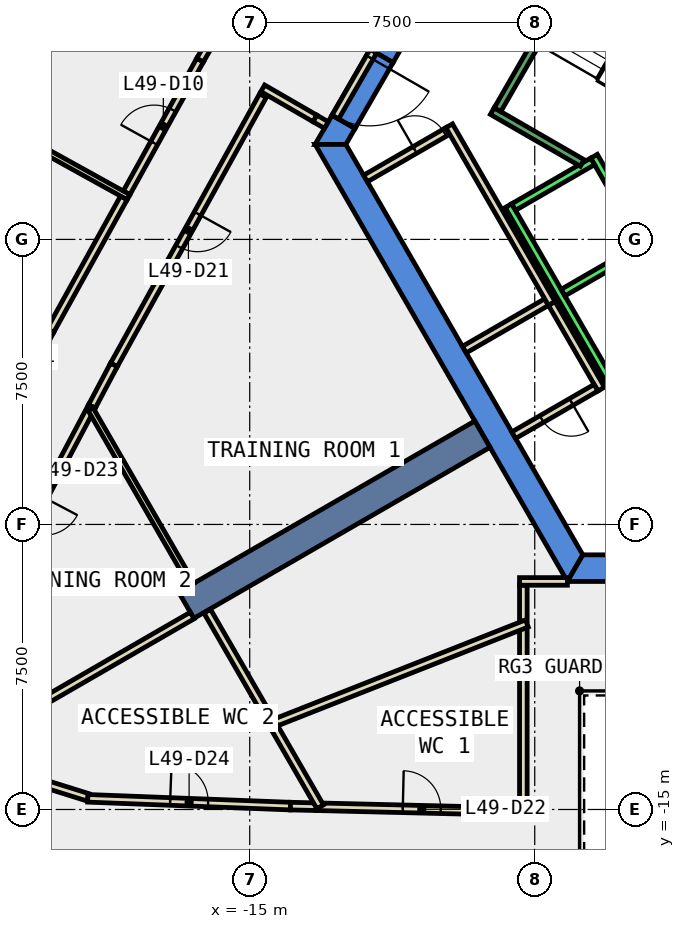
"""IFC4 building model, lengths in metres.
Left out: names, types, materials, properties, quantities, classifications, styles, units other than length and angle.
Written with IfcOpenShell. Run it as: python <this file> out.ifc"""

import sys

from ifc_helpers import new_model, si_unit, direction, frame, frame_2d, origin, place, context, subcontext, project, spatial, polyline, rectangle, outline, extrude, element, fill, save


model = new_model("IFC4")
c1 = context("Model", 3, precision=1e-05, world=origin(), true_north=direction((0.0, 1.0)))
c2 = subcontext(c1, "Body", "Model", "MODEL_VIEW")
j1 = project(units=[si_unit("LENGTHUNIT", "METRE"), si_unit("PLANEANGLEUNIT", "RADIAN")], contexts=[c1])
p1 = place(None, origin())
s1 = spatial("IfcSite", under=j1, at=p1, CompositionType="ELEMENT")
p2 = place(p1, origin())
s2 = spatial("IfcBuilding", under=s1, at=p2, CompositionType="ELEMENT")
p3 = place(p2, frame((0.0, 0.0, 219.2)))
s3 = spatial("IfcBuildingStorey", under=s2, at=p3, CompositionType="ELEMENT", Elevation=219.2)
p4 = place(p3, frame((0.0, 0.0, -0.4)))
e1 = element("IfcWall", 1, at=p4, inside=s3, PredefinedType="SHEAR", context=c2, shape_type="SweptSolid", body=[
    extrude(outline(polyline([(-11.834, 5.002), (-11.228, 4.652), (-6.235, 13.3), (-6.64, 14.0), (-11.834, 5.002)])), origin(), (0.0, 0.0, 1.0), 4.2),
])
p5 = place(p3, frame((0.0, 0.0, -0.4)))
e2 = element("IfcWall", 2, at=p5, inside=s3, PredefinedType="SHEAR", context=c2, shape_type="SweptSolid", body=[
    extrude(outline(polyline([(-12.228, 2.92), (-12.834, 3.27), (-13.279, 2.5), (-12.471, 2.5), (-12.228, 2.92)])), origin(), (0.0, 0.0, 1.0), 4.2),
])
p6 = place(p3, frame((0.0, 0.0, 3.6)))
e3 = element("IfcWall", 3, at=p6, inside=s3, PredefinedType="SHEAR", context=c2, shape_type="SweptSolid", body=[
    extrude(outline(polyline([(-12.834, 3.27), (-12.228, 2.92), (-11.228, 4.652), (-11.834, 5.002), (-12.834, 3.27)])), origin(), (0.0, 0.0, 1.0), 0.2),
])
p7 = place(p3, frame((0.0, 0.0, -0.4)))
e4 = element("IfcWall", 4, at=p7, inside=s3, PredefinedType="SHEAR", context=c2, shape_type="SweptSolid", body=[
    extrude(outline(polyline([(-13.279, 2.5), (-6.64, -9.0), (-6.235, -8.3), (-12.471, 2.5), (-13.279, 2.5)])), origin(), (0.0, 0.0, 1.0), 4.2),
])
p8 = place(p3, frame((0.0, 0.0, -0.4)))
e5 = element("IfcWall", 5, at=p8, inside=s3, PredefinedType="SHEAR", context=c2, shape_type="SweptSolid", body=[
    extrude(outline(polyline([(3.75, -9.0), (3.75, -8.3), (-6.235, -8.3), (-6.64, -9.0), (3.75, -9.0)])), origin(), (0.0, 0.0, 1.0), 4.2),
])
p9 = place(p3, frame((-8.877, -5.125, -0.4), z_axis=(0.0, 0.0, 1.0), x_axis=(-0.866017533419, -0.500013631625, 0.0)))
e6 = element("IfcWall", 6, at=p9, inside=s3, PredefinedType="SHEAR", context=c2, shape_type="SweptSolid", body=[
    extrude(rectangle(XDim=9.0, YDim=0.8, at=frame_2d((4.5, 0.0))), origin(), (0.0, 0.0, 1.0), 4.2),
])
p10 = place(p3, frame((-12.984, 3.01, 0.0), z_axis=(0.0, 0.0, 1.0), x_axis=(-0.866046247233, 0.49996389635, 0.0)))
e7 = element("IfcWall", 7, at=p10, inside=s3, PredefinedType="PARTITIONING", context=c2, shape_type="SweptSolid", body=[
    extrude(rectangle(XDim=0.35, YDim=0.2, at=frame_2d((0.175, 0.0))), origin(), (0.0, 0.0, 1.0), 2.4),
])
p11 = place(p3, frame((-14.652, 3.783, 0.0), z_axis=(0.0, 0.0, 1.0), x_axis=(-0.484249955458, -0.874929700398, 0.0)))
e8 = element("IfcWall", 8, at=p11, inside=s3, PredefinedType="PARTITIONING", context=c2, shape_type="SweptSolid", body=[
    extrude(rectangle(XDim=8.099, YDim=0.2, at=frame_2d((4.049, 0.0))), origin(), (0.0, 0.0, 1.0), 3.8),
])
p12 = place(p11, frame((3.55, 0.0, 0.0)))
e9 = element("IfcOpeningElement", 9, at=p12, cuts=e8, PredefinedType="OPENING", context=c2, shape_type="SweptSolid", body=[
    extrude(rectangle(XDim=1.0, YDim=2.1, at=frame_2d((0.5, 1.05))), frame((0.0, 0.11, 0.0), z_axis=(0.0, -1.0, 0.0), x_axis=(1.0, 0.0, 0.0)), (0.0, 0.0, 1.0), 0.22),
])
p13 = place(p3, frame((-18.574, -3.303, 0.0), z_axis=(0.0, 0.0, 1.0), x_axis=(-0.468458328651, -0.883485593724, 0.0)))
e10 = element("IfcWall", 10, at=p13, inside=s3, PredefinedType="PARTITIONING", context=c2, shape_type="SweptSolid", body=[
    extrude(rectangle(XDim=1.238, YDim=0.2, at=frame_2d((0.619, 0.0))), origin(), (0.0, 0.0, 1.0), 3.8),
])
p14 = place(p3, frame((-13.246, -14.927, 0.0), z_axis=(0.0, 0.0, 1.0), x_axis=(0.999708107757, -0.024159869312, 0.0)))
e11 = element("IfcWall", 11, at=p14, inside=s3, PredefinedType="PARTITIONING", context=c2, shape_type="SweptSolid", body=[
    extrude(rectangle(XDim=5.548, YDim=0.2, at=frame_2d((2.774, 0.0))), origin(), (0.0, 0.0, 1.0), 3.8),
])
p15 = place(p14, frame((2.274, 0.0, 0.0)))
e12 = element("IfcOpeningElement", 12, at=p15, cuts=e11, PredefinedType="OPENING", context=c2, shape_type="SweptSolid", body=[
    extrude(rectangle(XDim=1.0, YDim=2.1, at=frame_2d((0.5, 1.05))), frame((0.0, 0.11, 0.0), z_axis=(0.0, -1.0, 0.0), x_axis=(1.0, 0.0, 0.0)), (0.0, 0.0, 1.0), 0.22),
])
p16 = place(p3, frame((-19.154, -4.397, 0.0), z_axis=(0.0, 0.0, 1.0), x_axis=(-0.468118749105, -0.883665568378, 0.0)))
e13 = element("IfcWall", 13, at=p16, inside=s3, PredefinedType="PARTITIONING", context=c2, shape_type="SweptSolid", body=[
    extrude(rectangle(XDim=6.409, YDim=0.2, at=frame_2d((3.204, 0.0))), origin(), (0.0, 0.0, 1.0), 3.8),
])
p17 = place(p16, frame((2.704, 0.0, 0.0)))
e14 = element("IfcOpeningElement", 14, at=p17, cuts=e13, PredefinedType="OPENING", context=c2, shape_type="SweptSolid", body=[
    extrude(rectangle(XDim=1.0, YDim=2.1, at=frame_2d((0.5, 1.05))), frame((0.0, 0.11, 0.0), z_axis=(0.0, -1.0, 0.0), x_axis=(1.0, 0.0, 0.0)), (0.0, 0.0, 1.0), 0.22),
])
p18 = place(p3, frame((-21.759, -13.896, 0.0), z_axis=(0.0, 0.0, 1.0), x_axis=(0.954254371194, -0.298995978328, 0.0)))
e15 = element("IfcWall", 15, at=p18, inside=s3, PredefinedType="PARTITIONING", context=c2, shape_type="SweptSolid", body=[
    extrude(rectangle(XDim=2.622, YDim=0.2, at=frame_2d((1.311, 0.0))), origin(), (0.0, 0.0, 1.0), 3.8),
])
p19 = place(p3, frame((-19.261, -14.706, 0.0), z_axis=(0.0, 0.0, 1.0), x_axis=(0.999262930749, -0.038387435847, 0.0)))
e16 = element("IfcWall", 16, at=p19, inside=s3, PredefinedType="PARTITIONING", context=c2, shape_type="SweptSolid", body=[
    extrude(rectangle(XDim=5.336, YDim=0.2, at=frame_2d((2.668, 0.0))), origin(), (0.0, 0.0, 1.0), 3.8),
])
p20 = place(p19, frame((2.168, 0.0, 0.0)))
e17 = element("IfcOpeningElement", 17, at=p20, cuts=e16, PredefinedType="OPENING", context=c2, shape_type="SweptSolid", body=[
    extrude(rectangle(XDim=1.0, YDim=2.1, at=frame_2d((0.5, 1.05))), frame((0.0, 0.11, 0.0), z_axis=(0.0, -1.0, 0.0), x_axis=(1.0, 0.0, 0.0)), (0.0, 0.0, 1.0), 0.22),
])
p21 = place(p3, frame((-13.929, -14.911, 0.0), z_axis=(0.0, 0.0, 1.0), x_axis=(0.999721713829, -0.023590144123, 0.0)))
e18 = element("IfcWall", 18, at=p21, inside=s3, PredefinedType="PARTITIONING", context=c2, shape_type="SweptSolid", body=[
    extrude(rectangle(XDim=0.683, YDim=0.2, at=frame_2d((0.342, 0.0))), origin(), (0.0, 0.0, 1.0), 3.8),
])
p22 = place(p3, frame((-18.24, 1.225, 0.0), z_axis=(0.0, 0.0, 1.0), x_axis=(0.484411997038, 0.874839995156, 0.0)))
e19 = element("IfcWall", 19, at=p22, inside=s3, PredefinedType="PARTITIONING", context=c2, shape_type="SweptSolid", body=[
    extrude(rectangle(XDim=3.993, YDim=0.2, at=frame_2d((1.996, 0.0))), origin(), (0.0, 0.0, 1.0), 3.8),
])
p23 = place(p22, frame((1.496, 0.0, 0.0)))
e20 = element("IfcOpeningElement", 20, at=p23, cuts=e19, PredefinedType="OPENING", context=c2, shape_type="SweptSolid", body=[
    extrude(rectangle(XDim=1.0, YDim=2.1, at=frame_2d((0.5, 1.05))), frame((0.0, 0.11, 0.0), z_axis=(0.0, -1.0, 0.0), x_axis=(1.0, 0.0, 0.0)), (0.0, 0.0, 1.0), 0.22),
])
p24 = place(p3, frame((-16.306, 4.718, 0.0), z_axis=(0.0, 0.0, 1.0), x_axis=(0.499803646539, 0.866138738832, 0.0)))
e21 = element("IfcWall", 21, at=p24, inside=s3, PredefinedType="PARTITIONING", context=c2, shape_type="SweptSolid", body=[
    extrude(rectangle(XDim=3.991, YDim=0.2, at=frame_2d((1.996, 0.0))), origin(), (0.0, 0.0, 1.0), 3.8),
])
p25 = place(p3, frame((-22.14, -5.976, 0.0), z_axis=(0.0, 0.0, 1.0), x_axis=(0.467979143965, 0.883739509592, 0.0)))
e22 = element("IfcWall", 22, at=p25, inside=s3, PredefinedType="PARTITIONING", context=c2, shape_type="SweptSolid", body=[
    extrude(rectangle(XDim=4.049, YDim=0.2, at=frame_2d((2.024, 0.0))), origin(), (0.0, 0.0, 1.0), 3.8),
])
p26 = place(p25, frame((1.524, 0.0, 0.0)))
e23 = element("IfcOpeningElement", 23, at=p26, cuts=e22, PredefinedType="OPENING", context=c2, shape_type="SweptSolid", body=[
    extrude(rectangle(XDim=1.0, YDim=2.1, at=frame_2d((0.5, 1.05))), frame((0.0, 0.11, 0.0), z_axis=(0.0, -1.0, 0.0), x_axis=(1.0, 0.0, 0.0)), (0.0, 0.0, 1.0), 0.22),
])
p27 = place(p3, frame((-20.245, -2.398, 0.0), z_axis=(0.0, 0.0, 1.0), x_axis=(0.484328424129, 0.874886265511, 0.0)))
e24 = element("IfcWall", 24, at=p27, inside=s3, PredefinedType="PARTITIONING", context=c2, shape_type="SweptSolid", body=[
    extrude(rectangle(XDim=3.991, YDim=0.2, at=frame_2d((1.996, 0.0))), origin(), (0.0, 0.0, 1.0), 3.8),
])
p28 = place(p3, frame((-19.583, -16.569, 0.0), z_axis=(0.0, 0.0, 1.0), x_axis=(-0.954238750745, 0.299045826884, 0.0)))
e25 = element("IfcWall", 25, at=p28, inside=s3, PredefinedType="PARTITIONING", context=c2, shape_type="SweptSolid", body=[
    extrude(rectangle(XDim=3.318, YDim=0.2, at=frame_2d((1.659, 0.0))), origin(), (0.0, 0.0, 1.0), 3.8),
])
p29 = place(p28, frame((1.159, 0.0, 0.0)))
e26 = element("IfcOpeningElement", 26, at=p29, cuts=e25, PredefinedType="OPENING", context=c2, shape_type="SweptSolid", body=[
    extrude(rectangle(XDim=1.0, YDim=2.1, at=frame_2d((0.5, 1.05))), frame((0.0, 0.11, 0.0), z_axis=(0.0, -1.0, 0.0), x_axis=(1.0, 0.0, 0.0)), (0.0, 0.0, 1.0), 0.22),
])
p30 = place(p3, frame((-7.188, -1.65, 0.0), z_axis=(0.0, 0.0, 1.0), x_axis=(-0.866022959057, -0.500004234368, 0.0)))
e27 = element("IfcWall", 27, at=p30, inside=s3, PredefinedType="PARTITIONING", context=c2, shape_type="SweptSolid", body=[
    extrude(rectangle(XDim=2.5, YDim=0.2, at=frame_2d((1.25, 0.0))), origin(), (0.0, 0.0, 1.0), 3.8),
])
p31 = place(p3, frame((-11.953, 1.603, 0.0), z_axis=(0.0, 0.0, 1.0), x_axis=(0.865998541277, 0.500046524342, 0.0)))
e28 = element("IfcWall", 28, at=p31, inside=s3, PredefinedType="PARTITIONING", context=c2, shape_type="SweptSolid", body=[
    extrude(rectangle(XDim=2.5, YDim=0.2, at=frame_2d((1.25, 0.0))), origin(), (0.0, 0.0, 1.0), 3.8),
])
p32 = place(p31, frame((1.5, 0.0, 0.0)))
e29 = element("IfcOpeningElement", 29, at=p32, cuts=e28, PredefinedType="OPENING", context=c2, shape_type="SweptSolid", body=[
    extrude(rectangle(XDim=0.9, YDim=2.1, at=frame_2d((0.45, 1.05))), frame((0.0, 0.11, 0.0), z_axis=(0.0, -1.0, 0.0), x_axis=(1.0, 0.0, 0.0)), (0.0, 0.0, 1.0), 0.22),
])
p33 = place(p3, frame((-9.751, 2.99, 0.0), z_axis=(0.0, 0.0, 1.0), x_axis=(0.499955951776, -0.866050833545, 0.0)))
e30 = element("IfcWall", 30, at=p33, inside=s3, PredefinedType="PARTITIONING", context=c2, shape_type="SweptSolid", body=[
    extrude(rectangle(XDim=5.4, YDim=0.2, at=frame_2d((2.7, 0.0))), origin(), (0.0, 0.0, 1.0), 3.8),
])
p34 = place(p3, frame((-7.051, -1.687, 0.0), z_axis=(0.0, 0.0, 1.0), x_axis=(0.500128937424, -0.865950948929, 0.0)))
e31 = element("IfcWall", 31, at=p34, inside=s3, PredefinedType="PARTITIONING", context=c2, shape_type="SweptSolid", body=[
    extrude(rectangle(XDim=2.599, YDim=0.2, at=frame_2d((1.3, 0.0))), origin(), (0.0, 0.0, 1.0), 3.8),
])
p35 = place(p3, frame((-5.888, -3.902, 0.0), z_axis=(0.0, 0.0, 1.0), x_axis=(-0.866022959057, -0.500004234368, 0.0)))
e32 = element("IfcWall", 32, at=p35, inside=s3, PredefinedType="PARTITIONING", context=c2, shape_type="SweptSolid", body=[
    extrude(rectangle(XDim=2.5, YDim=0.2, at=frame_2d((1.25, 0.0))), origin(), (0.0, 0.0, 1.0), 3.8),
])
p36 = place(p35, frame((0.75, 0.0, 0.0)))
e33 = element("IfcOpeningElement", 33, at=p36, cuts=e32, PredefinedType="OPENING", context=c2, shape_type="SweptSolid", body=[
    extrude(rectangle(XDim=0.9, YDim=2.1, at=frame_2d((0.45, 1.05))), frame((0.0, 0.11, 0.0), z_axis=(0.0, -1.0, 0.0), x_axis=(1.0, 0.0, 0.0)), (0.0, 0.0, 1.0), 0.22),
])
p37 = place(p3, frame((-7.8, -10.041, 0.0), z_axis=(0.0, 0.0, 1.0), x_axis=(0.0, 1.0, 0.0)))
e34 = element("IfcWall", 34, at=p37, inside=s3, PredefinedType="PARTITIONING", context=c2, shape_type="SweptSolid", body=[
    extrude(rectangle(XDim=0.942, YDim=0.2, at=frame_2d((0.471, 0.0))), origin(), (0.0, 0.0, 1.0), 3.8),
])
p38 = place(p3, frame((-7.9, -8.999, 0.0), z_axis=(0.0, 0.0, 1.0), x_axis=(1.0, 0.0, 0.0)))
e35 = element("IfcWall", 35, at=p38, inside=s3, PredefinedType="PARTITIONING", context=c2, shape_type="SweptSolid", body=[
    extrude(rectangle(XDim=1.259, YDim=0.2, at=frame_2d((0.629, 0.0))), origin(), (0.0, 0.0, 1.0), 3.8),
])
p39 = place(p3, frame((-7.8, -14.959, 0.0), z_axis=(0.0, 0.0, 1.0), x_axis=(0.0, 1.0, 0.0)))
e36 = element("IfcWall", 36, at=p39, inside=s3, PredefinedType="PARTITIONING", context=c2, shape_type="SweptSolid", body=[
    extrude(rectangle(XDim=4.718, YDim=0.2, at=frame_2d((2.359, 0.0))), origin(), (0.0, 0.0, 1.0), 3.8),
])
p40 = place(p3, frame((-7.707, -10.105, 0.0), z_axis=(0.0, 0.0, 1.0), x_axis=(-0.930316800812, -0.36675693603, 0.0)))
e37 = element("IfcWall", 37, at=p40, inside=s3, PredefinedType="PARTITIONING", context=c2, shape_type="SweptSolid", body=[
    extrude(rectangle(XDim=7.302, YDim=0.2, at=frame_2d((3.651, 0.0))), origin(), (0.0, 0.0, 1.0), 3.8),
])
p41 = place(p3, frame((-16.525, -9.079, 0.0), z_axis=(0.0, 0.0, 1.0), x_axis=(-0.499943228252, 0.866058178487, 0.0)))
e38 = element("IfcWall", 38, at=p41, inside=s3, PredefinedType="PARTITIONING", context=c2, shape_type="SweptSolid", body=[
    extrude(rectangle(XDim=5.329, YDim=0.15, at=frame_2d((2.664, 0.0))), origin(), (0.0, 0.0, 1.0), 3.8),
])
p42 = place(p3, frame((-14.457, -12.66, 0.0), z_axis=(0.0, 0.0, 1.0), x_axis=(-0.49997268395, 0.866041174139, 0.0)))
e39 = element("IfcWall", 39, at=p42, inside=s3, PredefinedType="PARTITIONING", context=c2, shape_type="SweptSolid", body=[
    extrude(rectangle(XDim=3.322, YDim=0.2, at=frame_2d((1.661, 0.0))), origin(), (0.0, 0.0, 1.0), 3.8),
])
p43 = place(p3, frame((-13.146, -14.93, 0.0), z_axis=(0.0, 0.0, 1.0), x_axis=(-0.500086091327, 0.865975693228, 0.0)))
e40 = element("IfcWall", 40, at=p43, inside=s3, PredefinedType="PARTITIONING", context=c2, shape_type="SweptSolid", body=[
    extrude(rectangle(XDim=2.421, YDim=0.2, at=frame_2d((1.211, 0.0))), origin(), (0.0, 0.0, 1.0), 3.8),
])
p44 = place(p3, frame((-16.514, -9.897, 0.0), z_axis=(0.0, 0.0, 1.0), x_axis=(-0.866041209536, -0.499972622635, 0.0)))
e41 = element("IfcWall", 41, at=p44, inside=s3, PredefinedType="PARTITIONING", context=c2, shape_type="SweptSolid", body=[
    extrude(rectangle(XDim=6.843, YDim=0.2, at=frame_2d((3.421, 0.0))), origin(), (0.0, 0.0, 1.0), 3.8),
])
p45 = place(p3, frame((-18.189, 1.111, 0.0), z_axis=(0.0, 0.0, 1.0), x_axis=(-0.874928335558, 0.484252421405, 0.0)))
e42 = element("IfcWall", 42, at=p45, inside=s3, PredefinedType="PARTITIONING", context=c2, shape_type="SweptSolid", body=[
    extrude(rectangle(XDim=6.1, YDim=0.15, at=frame_2d((3.05, 0.0))), origin(), (0.0, 0.0, 1.0), 3.8),
])
p46 = place(p3, frame((-11.747, 4.952, 0.0), z_axis=(0.0, 0.0, 1.0), x_axis=(-0.50002537861, -0.866010750942, 0.0)))
e43 = element("IfcWall", 43, at=p46, inside=s3, PredefinedType="PARTITIONING", context=c2, shape_type="SweptSolid", body=[
    extrude(rectangle(XDim=2.0, YDim=0.2, at=frame_2d((1.0, 0.0))), origin(), (0.0, 0.0, 1.0), 2.4),
])
p47 = place(p46, frame((0.19, 0.0, 0.0)))
e44 = element("IfcOpeningElement", 44, at=p47, cuts=e43, PredefinedType="OPENING", context=c2, shape_type="SweptSolid", body=[
    extrude(rectangle(XDim=1.8, YDim=2.1, at=frame_2d((0.9, 1.05))), frame((0.0, 0.11, 0.0), z_axis=(0.0, -1.0, 0.0), x_axis=(1.0, 0.0, 0.0)), (0.0, 0.0, 1.0), 0.22),
])
p48 = place(p3, frame((-13.287, 3.185, 0.0), z_axis=(0.0, 0.0, 1.0), x_axis=(-0.865992812752, 0.500056445075, 0.0)))
e45 = element("IfcWall", 45, at=p48, inside=s3, PredefinedType="PARTITIONING", context=c2, shape_type="SweptSolid", body=[
    extrude(rectangle(XDim=1.582, YDim=0.2, at=frame_2d((0.791, 0.0))), origin(), (0.0, 0.0, 1.0), 3.8),
])
p49 = place(p3, frame((-5.94, 2.188, 0.0), z_axis=(0.0, 0.0, 1.0), x_axis=(0.500034260056, -0.866005622828, 0.0)))
e46 = element("IfcWall", 46, at=p49, inside=s3, PredefinedType="STANDARD", context=c2, shape_type="SweptSolid", body=[
    extrude(rectangle(XDim=5.399, YDim=0.2, at=frame_2d((2.7, 0.0))), origin(), (0.0, 0.0, 1.0), 3.8),
])
p50 = place(p49, frame((3.075, 0.0, 0.0)))
e47 = element("IfcOpeningElement", 47, at=p50, cuts=e46, PredefinedType="OPENING", context=c2, shape_type="SweptSolid", body=[
    extrude(rectangle(XDim=1.1, YDim=2.1, at=frame_2d((0.55, 1.05))), frame((0.0, 0.11, 0.0), z_axis=(0.0, -1.0, 0.0), x_axis=(1.0, 0.0, 0.0)), (0.0, 0.0, 1.0), 0.22),
])
p51 = place(p49, frame((1.225, 0.0, 0.0)))
e48 = element("IfcOpeningElement", 48, at=p51, cuts=e46, PredefinedType="OPENING", context=c2, shape_type="SweptSolid", body=[
    extrude(rectangle(XDim=1.1, YDim=2.1, at=frame_2d((0.55, 1.05))), frame((0.0, 0.11, 0.0), z_axis=(0.0, -1.0, 0.0), x_axis=(1.0, 0.0, 0.0)), (0.0, 0.0, 1.0), 0.22),
])
p52 = place(p3, frame((-8.192, 0.888, 0.0), z_axis=(0.0, 0.0, 1.0), x_axis=(0.500034260056, -0.866005622828, 0.0)))
e49 = element("IfcWall", 49, at=p52, inside=s3, PredefinedType="STANDARD", context=c2, shape_type="SweptSolid", body=[
    extrude(rectangle(XDim=5.399, YDim=0.2, at=frame_2d((2.7, 0.0))), origin(), (0.0, 0.0, 1.0), 3.8),
])
for number, where, z_axis, x_axis in (
    (50, (-5.977, 2.052, 0.0), (0.0, 0.0, 1.0), (-0.866, -0.5, 0.0)),
    (51, (-4.677, -0.2, 0.0), (0.0, 0.0, 1.0), (-0.866, -0.5, 0.0)),
):
    element("IfcWall", number, at=place(p3, frame(where, z_axis=z_axis, x_axis=x_axis)), inside=s3, PredefinedType="STANDARD", context=c2, shape_type="SweptSolid", body=[
        extrude(rectangle(XDim=2.399, YDim=0.2, at=frame_2d((1.2, 0.0))), origin(), (0.0, 0.0, 1.0), 3.8),
    ])
p53 = place(p3, frame((-6.25, 2.01, 0.0), z_axis=(0.0, 0.0, 1.0), x_axis=(-0.86611865017, 0.499838457731, 0.0)))
e52 = element("IfcWall", 52, at=p53, inside=s3, PredefinedType="STANDARD", context=c2, shape_type="SweptSolid", body=[
    extrude(rectangle(XDim=2.733, YDim=0.2, at=frame_2d((1.366, 0.0))), origin(), (0.0, 0.0, 1.0), 3.8),
])
p54 = place(p3, frame((-5.03, 9.388, 0.0), z_axis=(0.0, 0.0, 1.0), x_axis=(-0.499978703459, -0.866037698999, 0.0)))
e53 = element("IfcWall", 53, at=p54, inside=s3, PredefinedType="STANDARD", context=c2, shape_type="SweptSolid", body=[
    extrude(rectangle(XDim=6.9, YDim=0.2, at=frame_2d((3.45, 0.0))), origin(), (0.0, 0.0, 1.0), 3.8),
])
p55 = place(p23, origin())
e54 = element("IfcDoor", 54, at=p55, inside=s3, OperationType="SINGLE_SWING_LEFT", PredefinedType="DOOR", context=c2, shape_type="SweptSolid", body=[
    extrude(rectangle(XDim=1.0, YDim=2.1, at=frame_2d((0.5, 1.05))), frame((0.0, 0.025, 0.0), z_axis=(0.0, -1.0, 0.0), x_axis=(1.0, 0.0, 0.0)), (0.0, 0.0, 1.0), 0.05),
])
fill(e20, e54)
p56 = place(p12, origin())
e55 = element("IfcDoor", 55, at=p56, inside=s3, OperationType="SINGLE_SWING_LEFT", PredefinedType="DOOR", context=c2, shape_type="SweptSolid", body=[
    extrude(rectangle(XDim=1.0, YDim=2.1, at=frame_2d((0.5, 1.05))), frame((0.0, 0.025, 0.0), z_axis=(0.0, -1.0, 0.0), x_axis=(1.0, 0.0, 0.0)), (0.0, 0.0, 1.0), 0.05),
])
fill(e9, e55)
p57 = place(p15, origin())
e56 = element("IfcDoor", 56, at=p57, inside=s3, OperationType="SINGLE_SWING_LEFT", PredefinedType="DOOR", context=c2, shape_type="SweptSolid", body=[
    extrude(rectangle(XDim=1.0, YDim=2.1, at=frame_2d((0.5, 1.05))), frame((0.0, 0.025, 0.0), z_axis=(0.0, -1.0, 0.0), x_axis=(1.0, 0.0, 0.0)), (0.0, 0.0, 1.0), 0.05),
])
fill(e12, e56)
p58 = place(p20, origin())
e57 = element("IfcDoor", 57, at=p58, inside=s3, OperationType="SINGLE_SWING_LEFT", PredefinedType="DOOR", context=c2, shape_type="SweptSolid", body=[
    extrude(rectangle(XDim=1.0, YDim=2.1, at=frame_2d((0.5, 1.05))), frame((0.0, 0.025, 0.0), z_axis=(0.0, -1.0, 0.0), x_axis=(1.0, 0.0, 0.0)), (0.0, 0.0, 1.0), 0.05),
])
fill(e17, e57)
p59 = place(p32, origin())
e58 = element("IfcDoor", 58, at=p59, inside=s3, OperationType="SINGLE_SWING_LEFT", PredefinedType="DOOR", context=c2, shape_type="SweptSolid", body=[
    extrude(rectangle(XDim=0.9, YDim=2.1, at=frame_2d((0.45, 1.05))), frame((0.0, 0.025, 0.0), z_axis=(0.0, -1.0, 0.0), x_axis=(1.0, 0.0, 0.0)), (0.0, 0.0, 1.0), 0.05),
])
fill(e29, e58)
p60 = place(p36, origin())
e59 = element("IfcDoor", 59, at=p60, inside=s3, OperationType="SINGLE_SWING_RIGHT", PredefinedType="DOOR", context=c2, shape_type="SweptSolid", body=[
    extrude(rectangle(XDim=0.9, YDim=2.1, at=frame_2d((0.45, 1.05))), frame((0.0, 0.025, 0.0), z_axis=(0.0, -1.0, 0.0), x_axis=(1.0, 0.0, 0.0)), (0.0, 0.0, 1.0), 0.05),
])
fill(e33, e59)
p61 = place(p47, origin())
e60 = element("IfcDoor", 60, at=p61, inside=s3, OperationType="DOUBLE_DOOR_SINGLE_SWING", PredefinedType="DOOR", context=c2, shape_type="SweptSolid", body=[
    extrude(rectangle(XDim=1.8, YDim=2.1, at=frame_2d((0.9, 1.05))), frame((0.0, 0.025, 0.0), z_axis=(0.0, -1.0, 0.0), x_axis=(1.0, 0.0, 0.0)), (0.0, 0.0, 1.0), 0.05),
])
fill(e44, e60)
save(model, sys.argv[1])
